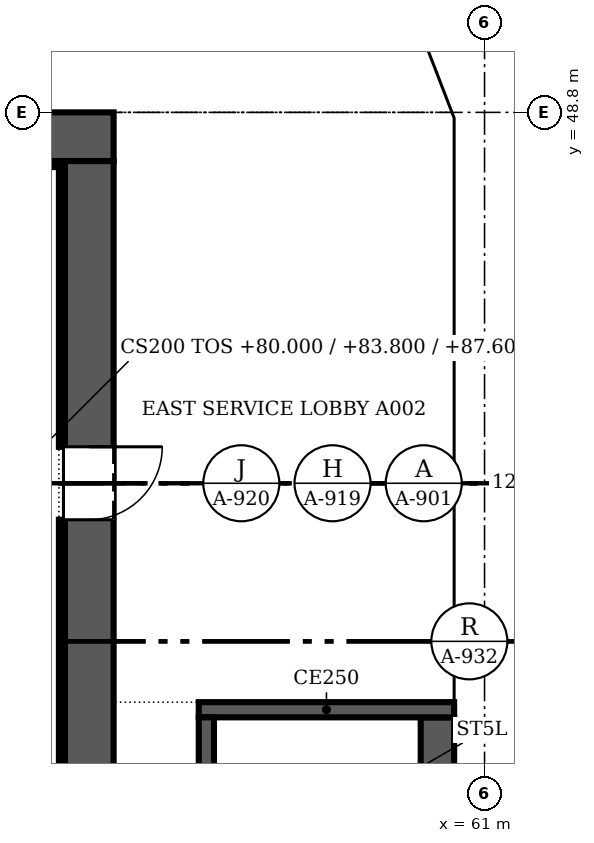
"""IFC4 building model, lengths in metres.
Left out: names, types, materials, properties, quantities, classifications, styles, units other than length and angle.
Written with IfcOpenShell. Run it as: python <this file> out.ifc"""

import sys

from ifc_helpers import new_model, si_unit, direction, frame, frame_2d, origin, place, context, subcontext, project, spatial, polyline, rectangle, outline, extrude, faceted_brep, source, transform, mapped, element, fill, save


model = new_model("IFC4")
c1 = context("Model", 3, precision=1e-05, world=origin(), true_north=direction((0.0, 1.0)))
c2 = subcontext(c1, "Body", "Model", "MODEL_VIEW")
j1 = project(units=[si_unit("LENGTHUNIT", "METRE"), si_unit("PLANEANGLEUNIT", "RADIAN")], contexts=[c1])
p1 = place(None, origin())
s1 = spatial("IfcSite", under=j1, at=p1, CompositionType="ELEMENT")
p2 = place(p1, origin())
s2 = spatial("IfcBuilding", under=s1, at=p2, CompositionType="ELEMENT")
p3 = place(p2, frame((0.0, 0.0, 80.0)))
s3 = spatial("IfcBuildingStorey", under=s2, at=p3, CompositionType="ELEMENT", Elevation=80.0)
m1 = source(origin(), c2, "Body", "Brep", [
    faceted_brep([(3.05, -0.25, 0.0), (6.1, -0.25, 3.8), (6.1, -0.25, 3.8), (3.05, -0.25, 7.6), (0.0, -0.25, 3.8), (0.0, 0.25, 3.8), (3.05, 0.25, 7.6), (6.1, 0.25, 3.8), (6.1, 0.25, 3.8), (3.05, 0.25, 0.0)], [[[0, 1, 2, 3, 4]], [[5, 6, 7, 8, 9]], [[9, 8, 1, 0]], [[7, 6, 3, 2]], [[6, 5, 4, 3]], [[5, 9, 0, 4]], [[1, 8, 7, 2]]]),
])
p4 = place(p3, frame((60.75, 33.55, -3.8), z_axis=(0.0, 0.0, 1.0), x_axis=(0.0, 1.0, 0.0)))
e1 = element("IfcWall", 1, at=p4, inside=s3, PredefinedType="SOLIDWALL", context=c2, shape_type="MappedRepresentation", body=[
    mapped(m1, transform((0.0, 0.0, 0.0), scale=1.0)),
])
m2 = source(origin(), c2, "Body", "SweptSolid", [
    extrude(outline(polyline([(3.05, 0.399), (5.78, 3.8), (3.05, 7.201), (0.321, 3.8), (3.05, 0.399)])), frame((0.0, 0.26, 0.0), z_axis=(0.0, -1.0, 0.0), x_axis=(1.0, 0.0, 0.0)), (0.0, 0.0, 1.0), 0.52),
])
p5 = place(p4, origin())
e2 = element("IfcOpeningElement", 2, at=p5, cuts=e1, PredefinedType="OPENING", context=c2, shape_type="MappedRepresentation", body=[
    mapped(m2, transform((0.0, 0.0, 0.0), scale=1.0)),
])
m3 = source(origin(), c2, "Body", "SweptSolid", [
    extrude(outline(polyline([(3.05, 0.0), (6.1, 3.8), (3.05, 7.6), (0.0, 3.8), (3.05, 0.0)])), frame((0.0, 0.25, 0.0), z_axis=(0.0, -1.0, 0.0), x_axis=(1.0, 0.0, 0.0)), (0.0, 0.0, 1.0), 0.5),
])
p6 = place(p3, frame((60.75, 39.65, -3.8), z_axis=(0.0, 0.0, 1.0), x_axis=(0.0, 1.0, 0.0)))
e3 = element("IfcWall", 3, at=p6, inside=s3, PredefinedType="SOLIDWALL", context=c2, shape_type="MappedRepresentation", body=[
    mapped(m3, transform((0.0, 0.0, 0.0), scale=1.0)),
])
p7 = place(p6, origin())
e4 = element("IfcOpeningElement", 4, at=p7, cuts=e3, PredefinedType="OPENING", context=c2, shape_type="MappedRepresentation", body=[
    mapped(m2, transform((0.0, 0.0, 0.0), scale=1.0)),
])
m4 = source(origin(), c2, "Body", "Brep", [
    faceted_brep([(3.003, -0.25, 0.0), (3.05, -0.25, 0.06), (3.05, -0.25, 7.54), (3.003, -0.25, 7.6), (0.0, -0.25, 3.8), (0.0, 0.25, 3.8), (2.957, 0.25, 7.541), (2.957, 0.25, 0.059), (3.003, 0.0, 0.0), (3.003, 0.0, 7.6)], [[[0, 1, 2, 3, 4]], [[5, 6, 7]], [[1, 0, 8]], [[9, 3, 2]], [[6, 5, 4, 3, 9]], [[5, 7, 8, 0, 4]], [[1, 8, 7, 6, 9, 2]]]),
])
p8 = place(p3, frame((60.75, 45.75, -3.8), z_axis=(0.0, 0.0, 1.0), x_axis=(0.0, 1.0, 0.0)))
e5 = element("IfcWall", 5, at=p8, inside=s3, PredefinedType="SOLIDWALL", context=c2, shape_type="MappedRepresentation", body=[
    mapped(m4, transform((0.0, 0.0, 0.0), scale=1.0)),
])
m5 = source(origin(), c2, "Body", "SweptSolid", [
    extrude(outline(polyline([(2.803, 6.944), (0.319, 3.8), (2.803, 0.656), (2.803, 6.944)])), frame((0.0, 0.26, 0.0), z_axis=(0.0, -1.0, 0.0), x_axis=(1.0, 0.0, 0.0)), (0.0, 0.0, 1.0), 0.52),
])
p9 = place(p8, origin())
e6 = element("IfcOpeningElement", 6, at=p9, cuts=e5, PredefinedType="OPENING", context=c2, shape_type="MappedRepresentation", body=[
    mapped(m5, transform((0.0, 0.0, 0.0), scale=1.0)),
])
m6 = source(origin(), c2, "Body", "Brep", [
    faceted_brep([(0.047, -0.25, 0.0), (2.997, -0.25, 3.8), (0.047, -0.25, 7.6), (0.0, -0.25, 7.541), (0.0, -0.25, 0.059), (0.093, 0.25, 7.54), (2.944, 0.25, 3.868), (2.944, 0.25, 3.732), (0.093, 0.25, 0.06), (2.997, 0.0, 3.8), (0.047, 0.0, 0.0), (0.047, 0.0, 7.6)], [[[0, 1, 2, 3, 4]], [[5, 6, 7, 8]], [[8, 7, 9, 1, 0, 10]], [[6, 5, 11, 2, 1, 9]], [[3, 2, 11]], [[10, 0, 4]], [[8, 10, 4, 3, 11, 5]], [[9, 7, 6]]]),
])
p10 = place(p3, frame((60.767, 48.71, -3.8), z_axis=(0.0, 0.0, 1.0), x_axis=(-0.359901446078, 0.932990326376, 0.0)))
e7 = element("IfcWall", 7, at=p10, inside=s3, PredefinedType="SOLIDWALL", context=c2, shape_type="MappedRepresentation", body=[
    mapped(m6, transform((0.0, 0.0, 0.0), scale=1.0)),
])
m7 = source(origin(), c2, "Body", "SweptSolid", [
    extrude(outline(polyline([(0.247, 0.665), (2.681, 3.8), (0.247, 6.935), (0.247, 0.665)])), frame((0.0, 0.26, 0.0), z_axis=(0.0, -1.0, 0.0), x_axis=(1.0, 0.0, 0.0)), (0.0, 0.0, 1.0), 0.52),
])
p11 = place(p10, origin())
e8 = element("IfcOpeningElement", 8, at=p11, cuts=e7, PredefinedType="OPENING", context=c2, shape_type="MappedRepresentation", body=[
    mapped(m7, transform((0.0, 0.0, 0.0), scale=1.0)),
])
p12 = place(p2, frame((0.0, 0.0, 83.8)))
s4 = spatial("IfcBuildingStorey", under=s2, at=p12, CompositionType="ELEMENT", Elevation=83.8)
p13 = place(p12, frame((60.75, 36.6, -3.8), z_axis=(0.0, 0.0, 1.0), x_axis=(0.0, 1.0, 0.0)))
e9 = element("IfcWall", 9, at=p13, inside=s4, PredefinedType="SOLIDWALL", context=c2, shape_type="MappedRepresentation", body=[
    mapped(m1, transform((0.0, 0.0, 0.0), scale=1.0)),
])
p14 = place(p13, origin())
e10 = element("IfcOpeningElement", 10, at=p14, cuts=e9, PredefinedType="OPENING", context=c2, shape_type="MappedRepresentation", body=[
    mapped(m2, transform((0.0, 0.0, 0.0), scale=1.0)),
])
m8 = source(origin(), c2, "Body", "Brep", [
    faceted_brep([(3.05, -0.25, 0.0), (6.053, -0.25, 3.8), (3.05, -0.25, 7.6), (0.0, -0.25, 3.8), (0.0, 0.25, 3.8), (3.05, 0.25, 7.6), (6.007, 0.25, 3.859), (6.007, 0.25, 3.741), (3.05, 0.25, 0.0), (6.053, 0.0, 3.8)], [[[0, 1, 2, 3]], [[4, 5, 6, 7, 8]], [[8, 7, 9, 1, 0]], [[6, 5, 2, 1, 9]], [[5, 4, 3, 2]], [[4, 8, 0, 3]], [[9, 7, 6]]]),
])
p15 = place(p12, frame((60.75, 42.7, -3.8), z_axis=(0.0, 0.0, 1.0), x_axis=(0.0, 1.0, 0.0)))
e11 = element("IfcWall", 11, at=p15, inside=s4, PredefinedType="SOLIDWALL", context=c2, shape_type="MappedRepresentation", body=[
    mapped(m8, transform((0.0, 0.0, 0.0), scale=1.0)),
])
m9 = source(origin(), c2, "Body", "SweptSolid", [
    extrude(outline(polyline([(3.049, 0.401), (5.735, 3.8), (3.049, 7.199), (0.321, 3.8), (3.049, 0.401)])), frame((0.0, 0.26, 0.0), z_axis=(0.0, -1.0, 0.0), x_axis=(1.0, 0.0, 0.0)), (0.0, 0.0, 1.0), 0.52),
])
p16 = place(p15, origin())
e12 = element("IfcOpeningElement", 12, at=p16, cuts=e11, PredefinedType="OPENING", context=c2, shape_type="MappedRepresentation", body=[
    mapped(m9, transform((0.0, 0.0, 0.0), scale=1.0)),
])
m10 = source(origin(), c2, "Body", "Brep", [
    faceted_brep([(2.95, -0.25, 0.0), (3.003, -0.25, 0.068), (3.003, -0.25, 7.532), (2.95, -0.25, 7.6), (0.0, -0.25, 3.8), (0.047, 0.25, 3.86), (2.898, 0.25, 7.532), (2.898, 0.25, 0.068), (0.047, 0.25, 3.74), (2.95, 0.0, 0.0), (2.95, 0.0, 7.6), (0.0, 0.0, 3.8)], [[[0, 1, 2, 3, 4]], [[5, 6, 7, 8]], [[1, 0, 9]], [[10, 3, 2]], [[6, 5, 11, 4, 3, 10]], [[8, 7, 9, 0, 4, 11]], [[8, 11, 5]], [[1, 9, 7, 6, 10, 2]]]),
])
p17 = place(p12, frame((60.75, 48.753, -3.8), z_axis=(0.0, 0.0, 1.0), x_axis=(-0.35992665181, 0.932980602862, 0.0)))
e13 = element("IfcWall", 13, at=p17, inside=s4, PredefinedType="SOLIDWALL", context=c2, shape_type="MappedRepresentation", body=[
    mapped(m10, transform((0.0, 0.0, 0.0), scale=1.0)),
])
m11 = source(origin(), c2, "Body", "SweptSolid", [
    extrude(outline(polyline([(2.75, 6.935), (0.316, 3.8), (2.75, 0.665), (2.75, 6.935)])), frame((0.0, 0.26, 0.0), z_axis=(0.0, -1.0, 0.0), x_axis=(1.0, 0.0, 0.0)), (0.0, 0.0, 1.0), 0.52),
])
p18 = place(p17, origin())
e14 = element("IfcOpeningElement", 14, at=p18, cuts=e13, PredefinedType="OPENING", context=c2, shape_type="MappedRepresentation", body=[
    mapped(m11, transform((0.0, 0.0, 0.0), scale=1.0)),
])
p19 = place(p3, frame((30.5, 48.4, 0.0), z_axis=(0.0, 0.0, 1.0), x_axis=(1.0, 0.0, 0.0)))
e15 = element("IfcWall", 15, at=p19, inside=s3, PredefinedType="SHEAR", context=c2, shape_type="SweptSolid", body=[
    extrude(rectangle(XDim=24.4, YDim=0.8, at=frame_2d((12.2, 0.0))), origin(), (0.0, 0.0, 1.0), 3.8),
])
p20 = place(p3, frame((54.5, 48.0, 0.0), z_axis=(0.0, 0.0, 1.0), x_axis=(0.0, -1.0, 0.0)))
e16 = element("IfcWall", 16, at=p20, inside=s3, PredefinedType="SHEAR", context=c2, shape_type="SweptSolid", body=[
    extrude(rectangle(XDim=22.8, YDim=0.8, at=frame_2d((11.4, 0.0))), origin(), (0.0, 0.0, 1.0), 3.8),
])
m12 = source(origin(), c2, "Body", "SweptSolid", [
    extrude(rectangle(XDim=1.2, YDim=2.1, at=frame_2d((0.6, 1.05))), frame((0.0, 0.41, 0.0), z_axis=(0.0, -1.0, 0.0), x_axis=(1.0, 0.0, 0.0)), (0.0, 0.0, 1.0), 0.82),
])
p21 = place(p20, frame((4.7, 0.0, 0.0)))
e17 = element("IfcOpeningElement", 17, at=p21, cuts=e16, PredefinedType="OPENING", context=c2, shape_type="MappedRepresentation", body=[
    mapped(m12, transform((0.0, 0.0, 0.0), scale=1.0)),
])
p22 = place(p3, frame((31.3, 47.95, 0.0), z_axis=(0.0, 0.0, 1.0), x_axis=(1.0, 0.0, 0.0)))
e18 = element("IfcWall", 18, at=p22, inside=s3, PredefinedType="SOLIDWALL", context=c2, shape_type="SweptSolid", body=[
    extrude(rectangle(XDim=22.8, YDim=0.1, at=frame_2d((11.4, 0.0))), origin(), (0.0, 0.0, 1.0), 3.8),
])
p23 = place(p3, frame((54.05, 36.88, 0.0), z_axis=(0.0, 0.0, 1.0), x_axis=(0.0, 1.0, 0.0)))
e19 = element("IfcWall", 19, at=p23, inside=s3, PredefinedType="SOLIDWALL", context=c2, shape_type="SweptSolid", body=[
    extrude(rectangle(XDim=5.22, YDim=0.1, at=frame_2d((2.61, 0.0))), origin(), (0.0, 0.0, 1.0), 3.8),
])
p24 = place(p3, frame((54.05, 43.3, 0.0), z_axis=(0.0, 0.0, 1.0), x_axis=(0.0, 1.0, 0.0)))
e20 = element("IfcWall", 20, at=p24, inside=s3, PredefinedType="SOLIDWALL", context=c2, shape_type="SweptSolid", body=[
    extrude(rectangle(XDim=4.6, YDim=0.1, at=frame_2d((2.3, 0.0))), origin(), (0.0, 0.0, 1.0), 3.8),
])
p25 = place(p3, frame((56.425, 30.85, 0.0), z_axis=(0.0, 0.0, 1.0), x_axis=(0.0, 1.0, 0.0)))
e21 = element("IfcWall", 21, at=p25, inside=s3, PredefinedType="SOLIDWALL", context=c2, shape_type="SweptSolid", body=[
    extrude(rectangle(XDim=8.0, YDim=0.25, at=frame_2d((4.0, 0.0))), origin(), (0.0, 0.0, 1.0), 3.8),
])
p26 = place(p3, frame((56.3, 38.975, 0.0), z_axis=(0.0, 0.0, 1.0), x_axis=(1.0, 0.0, 0.0)))
e22 = element("IfcWall", 22, at=p26, inside=s3, PredefinedType="SOLIDWALL", context=c2, shape_type="SweptSolid", body=[
    extrude(rectangle(XDim=4.2, YDim=0.25, at=frame_2d((2.1, 0.0))), origin(), (0.0, 0.0, 1.0), 3.8),
])
p27 = place(p3, frame((60.225, 38.85, 0.0), z_axis=(0.0, 0.0, 1.0), x_axis=(0.0, -1.0, 0.0)))
e23 = element("IfcWall", 23, at=p27, inside=s3, PredefinedType="SOLIDWALL", context=c2, shape_type="SweptSolid", body=[
    extrude(rectangle(XDim=8.0, YDim=0.55, at=frame_2d((4.0, 0.0))), origin(), (0.0, 0.0, 1.0), 3.8),
])
m13 = source(origin(), c2, "Body", "SweptSolid", [
    extrude(rectangle(XDim=1.2, YDim=2.1, at=frame_2d((0.6, 1.05))), frame((0.0, 0.025, 0.0), z_axis=(0.0, -1.0, 0.0), x_axis=(1.0, 0.0, 0.0)), (0.0, 0.0, 1.0), 0.05),
])
p28 = place(p21, origin())
e24 = element("IfcDoor", 24, at=p28, inside=s3, OperationType="SINGLE_SWING_LEFT", PredefinedType="DOOR", context=c2, shape_type="MappedRepresentation", body=[
    mapped(m13, transform((0.0, 0.0, 0.0), scale=1.0)),
])
fill(e17, e24)
save(model, sys.argv[1])
